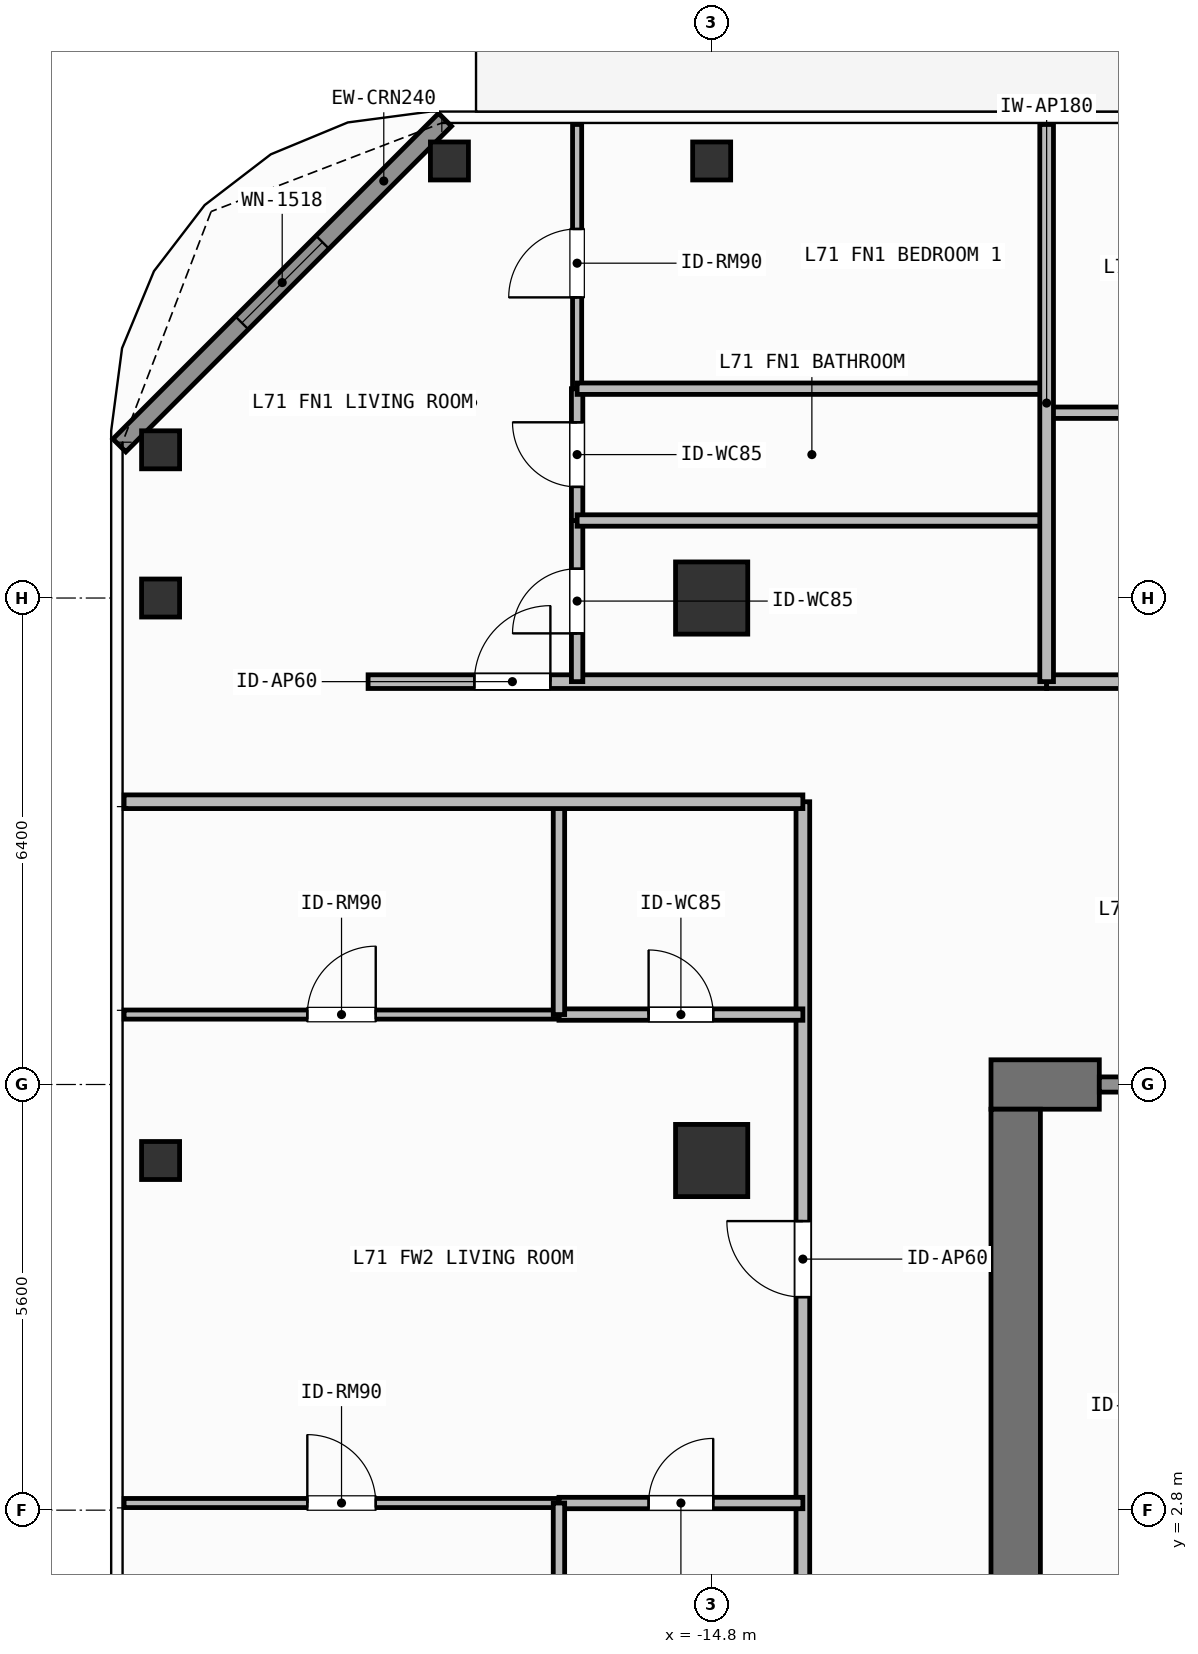
"""IFC4 building model, lengths in metres.
Left out: names, types, materials, properties, quantities, classifications, styles, units other than length and angle.
Written with IfcOpenShell. Run it as: python <this file> out.ifc"""

import sys

from ifc_helpers import new_model, si_unit, direction, frame, frame_2d, origin, origin_2d, place, context, subcontext, project, spatial, rectangle, hollow_rectangle, extrude, element, fill, save


model = new_model("IFC4")
c1 = context("Model", 3, precision=1e-05, world=origin(), true_north=direction((0.0, 1.0)))
c2 = subcontext(c1, "Body", "Model", "MODEL_VIEW")
j1 = project(units=[si_unit("LENGTHUNIT", "METRE"), si_unit("PLANEANGLEUNIT", "RADIAN")], contexts=[c1])
p1 = place(None, origin())
s1 = spatial("IfcSite", under=j1, at=p1, CompositionType="ELEMENT")
p2 = place(p1, origin())
s2 = spatial("IfcBuilding", under=s1, at=p2, CompositionType="ELEMENT")
p3 = place(p2, frame((0.0, 0.0, 289.8)))
s3 = spatial("IfcBuildingStorey", under=s2, at=p3, CompositionType="ELEMENT", Elevation=289.8)
p4 = place(p3, frame((-11.125, 8.4, 0.0), z_axis=(0.0, 0.0, 1.0), x_axis=(1.0, 0.0, 0.0)))
e1 = element("IfcWall", 1, at=p4, inside=s3, PredefinedType="SHEAR", context=c2, shape_type="SweptSolid", body=[
    extrude(rectangle(XDim=1.425, YDim=0.65, at=frame_2d((0.712, 0.0))), origin(), (0.0, 0.0, 1.0), 3.9),
])
p5 = place(p3, frame((-10.8, -8.075, 0.0), z_axis=(0.0, 0.0, 1.0), x_axis=(0.0, 1.0, 0.0)))
e2 = element("IfcWall", 2, at=p5, inside=s3, PredefinedType="SHEAR", context=c2, shape_type="SweptSolid", body=[
    extrude(rectangle(XDim=16.15, YDim=0.65, at=frame_2d((8.075, 0.0))), origin(), (0.0, 0.0, 1.0), 3.9),
])
for number, where, z_axis, x_axis in (
    (3, (-14.8, 14.8, 0.0), (0.0, 0.0, 1.0), (1.0, 0.0, 0.0)),
    (4, (-14.8, 7.4, 0.0), (0.0, 0.0, 1.0), (1.0, 0.0, 0.0)),
):
    element("IfcColumn", number, at=place(p3, frame(where, z_axis=z_axis, x_axis=x_axis)), inside=s3, PredefinedType="COLUMN", context=c2, shape_type="SweptSolid", body=[
        extrude(rectangle(XDim=0.95, YDim=0.95, at=origin_2d()), origin(), (0.0, 0.0, 1.0), 3.9),
    ])
for number, where, z_axis, x_axis in (
    (5, (-18.25, 20.55, 0.0), (0.0, 0.0, 1.0), (1.0, 0.0, 0.0)),
    (6, (-22.05, 16.75, 0.0), (0.0, 0.0, 1.0), (1.0, 0.0, 0.0)),
    (7, (-14.8, 20.55, 0.0), (0.0, 0.0, 1.0), (1.0, 0.0, 0.0)),
    (8, (-22.05, 7.4, 0.0), (0.0, 0.0, 1.0), (1.0, 0.0, 0.0)),
    (9, (-22.05, 14.8, 0.0), (0.0, 0.0, 1.0), (1.0, 0.0, 0.0)),
):
    element("IfcColumn", number, at=place(p3, frame(where, z_axis=z_axis, x_axis=x_axis)), inside=s3, PredefinedType="COLUMN", context=c2, shape_type="SweptSolid", body=[
        extrude(hollow_rectangle(XDim=0.5, YDim=0.5, WallThickness=0.025, at=origin_2d()), origin(), (0.0, 0.0, 1.0), 3.9),
    ])
p6 = place(p3, frame((-22.592, 16.808, 0.0), z_axis=(0.0, 0.0, 1.0), x_axis=(0.707106781187, 0.707106781187, 0.0)))
e10 = element("IfcWall", 10, at=p6, inside=s3, PredefinedType="SOLIDWALL", context=c2, shape_type="SweptSolid", body=[
    extrude(rectangle(XDim=6.059, YDim=0.24, at=frame_2d((3.03, 0.0))), origin(), (0.0, 0.0, 1.0), 3.68),
])
p7 = place(p6, frame((2.28, 0.0, 0.8)))
e11 = element("IfcOpeningElement", 11, at=p7, cuts=e10, PredefinedType="OPENING", context=c2, shape_type="SweptSolid", body=[
    extrude(rectangle(XDim=1.5, YDim=1.85, at=frame_2d((0.75, 0.925))), frame((0.0, 0.13, 0.0), z_axis=(0.0, -1.0, 0.0), x_axis=(1.0, 0.0, 0.0)), (0.0, 0.0, 1.0), 0.26),
])
p8 = place(p3, frame((-9.7, 8.4, 0.0), z_axis=(0.0, 0.0, 1.0), x_axis=(1.0, 0.0, 0.0)))
e12 = element("IfcWall", 12, at=p8, inside=s3, PredefinedType="SOLIDWALL", context=c2, shape_type="SweptSolid", body=[
    extrude(rectangle(XDim=2.15, YDim=0.2, at=frame_2d((1.075, 0.0))), origin(), (0.0, 0.0, 1.0), 2.92),
])
p9 = place(p8, frame((0.598, 0.0, 0.0)))
e13 = element("IfcOpeningElement", 13, at=p9, cuts=e12, PredefinedType="OPENING", context=c2, shape_type="SweptSolid", body=[
    extrude(rectangle(XDim=1.1, YDim=2.15, at=frame_2d((0.55, 1.075))), frame((0.0, 0.11, 0.0), z_axis=(0.0, -1.0, 0.0), x_axis=(1.0, 0.0, 0.0)), (0.0, 0.0, 1.0), 0.22),
])
p10 = place(p3, frame((-19.32, 13.7, 0.0), z_axis=(0.0, 0.0, 1.0), x_axis=(1.0, 0.0, 0.0)))
e14 = element("IfcWall", 14, at=p10, inside=s3, PredefinedType="PARTITIONING", context=c2, shape_type="SweptSolid", body=[
    extrude(rectangle(XDim=8.927, YDim=0.18, at=frame_2d((4.463, 0.0))), origin(), (0.0, 0.0, 1.0), 3.68),
])
p11 = place(p10, frame((1.398, 0.0, 0.0)))
e15 = element("IfcOpeningElement", 15, at=p11, cuts=e14, PredefinedType="OPENING", context=c2, shape_type="SweptSolid", body=[
    extrude(rectangle(XDim=1.0, YDim=2.2, at=frame_2d((0.5, 1.1))), frame((0.0, 0.1, 0.0), z_axis=(0.0, -1.0, 0.0), x_axis=(1.0, 0.0, 0.0)), (0.0, 0.0, 1.0), 0.2),
])
p12 = place(p3, frame((-16.57, 13.7, 0.0), z_axis=(0.0, 0.0, 1.0), x_axis=(0.0, 1.0, 0.0)))
e16 = element("IfcWall", 16, at=p12, inside=s3, PredefinedType="PARTITIONING", context=c2, shape_type="SweptSolid", body=[
    extrude(rectangle(XDim=2.12, YDim=0.15, at=frame_2d((1.06, 0.0))), origin(), (0.0, 0.0, 1.0), 3.68),
])
p13 = place(p12, frame((0.635, 0.0, 0.0)))
e17 = element("IfcOpeningElement", 17, at=p13, cuts=e16, PredefinedType="OPENING", context=c2, shape_type="SweptSolid", body=[
    extrude(rectangle(XDim=0.85, YDim=2.1, at=frame_2d((0.425, 1.05))), frame((0.0, 0.085, 0.0), z_axis=(0.0, -1.0, 0.0), x_axis=(1.0, 0.0, 0.0)), (0.0, 0.0, 1.0), 0.17),
])
p14 = place(p3, frame((-16.57, 15.82, 0.0), z_axis=(0.0, 0.0, 1.0), x_axis=(0.0, 1.0, 0.0)))
e18 = element("IfcWall", 18, at=p14, inside=s3, PredefinedType="PARTITIONING", context=c2, shape_type="SweptSolid", body=[
    extrude(rectangle(XDim=1.734, YDim=0.15, at=frame_2d((0.867, 0.0))), origin(), (0.0, 0.0, 1.0), 3.68),
])
p15 = place(p14, frame((0.442, 0.0, 0.0)))
e19 = element("IfcOpeningElement", 19, at=p15, cuts=e18, PredefinedType="OPENING", context=c2, shape_type="SweptSolid", body=[
    extrude(rectangle(XDim=0.85, YDim=2.1, at=frame_2d((0.425, 1.05))), frame((0.0, 0.085, 0.0), z_axis=(0.0, -1.0, 0.0), x_axis=(1.0, 0.0, 0.0)), (0.0, 0.0, 1.0), 0.17),
])
p16 = place(p3, frame((-16.57, 17.554, 0.0), z_axis=(0.0, 0.0, 1.0), x_axis=(0.0, 1.0, 0.0)))
e20 = element("IfcWall", 20, at=p16, inside=s3, PredefinedType="PARTITIONING", context=c2, shape_type="SweptSolid", body=[
    extrude(rectangle(XDim=3.476, YDim=0.12, at=frame_2d((1.738, 0.0))), origin(), (0.0, 0.0, 1.0), 3.68),
])
p17 = place(p16, frame((1.201, 0.0, 0.0)))
e21 = element("IfcOpeningElement", 21, at=p17, cuts=e20, PredefinedType="OPENING", context=c2, shape_type="SweptSolid", body=[
    extrude(rectangle(XDim=0.9, YDim=2.1, at=frame_2d((0.45, 1.05))), frame((0.0, 0.07, 0.0), z_axis=(0.0, -1.0, 0.0), x_axis=(1.0, 0.0, 0.0)), (0.0, 0.0, 1.0), 0.14),
])
p18 = place(p3, frame((-10.393, 13.7, 0.0), z_axis=(0.0, 0.0, 1.0), x_axis=(1.0, 0.0, 0.0)))
e22 = element("IfcWall", 22, at=p18, inside=s3, PredefinedType="PARTITIONING", context=c2, shape_type="SweptSolid", body=[
    extrude(rectangle(XDim=15.835, YDim=0.18, at=frame_2d((7.917, 0.0))), origin(), (0.0, 0.0, 1.0), 3.68),
])
p19 = place(p18, frame((8.224, 0.0, 0.0)))
e23 = element("IfcOpeningElement", 23, at=p19, cuts=e22, PredefinedType="OPENING", context=c2, shape_type="SweptSolid", body=[
    extrude(rectangle(XDim=1.0, YDim=2.2, at=frame_2d((0.5, 1.1))), frame((0.0, 0.1, 0.0), z_axis=(0.0, -1.0, 0.0), x_axis=(1.0, 0.0, 0.0)), (0.0, 0.0, 1.0), 0.2),
])
p20 = place(p3, frame((-13.6, -1.164, 0.0), z_axis=(0.0, 0.0, 1.0), x_axis=(0.0, 1.0, 0.0)))
e24 = element("IfcWall", 24, at=p20, inside=s3, PredefinedType="PARTITIONING", context=c2, shape_type="SweptSolid", body=[
    extrude(rectangle(XDim=13.284, YDim=0.18, at=frame_2d((6.642, 0.0))), origin(), (0.0, 0.0, 1.0), 3.68),
])
p21 = place(p20, frame((6.767, 0.0, 0.0)))
e25 = element("IfcOpeningElement", 25, at=p21, cuts=e24, PredefinedType="OPENING", context=c2, shape_type="SweptSolid", body=[
    extrude(rectangle(XDim=1.0, YDim=2.2, at=frame_2d((0.5, 1.1))), frame((0.0, 0.1, 0.0), z_axis=(0.0, -1.0, 0.0), x_axis=(1.0, 0.0, 0.0)), (0.0, 0.0, 1.0), 0.2),
])
p22 = place(p3, frame((-16.809, 9.32, 0.0), z_axis=(0.0, 0.0, 1.0), x_axis=(1.0, 0.0, 0.0)))
e26 = element("IfcWall", 26, at=p22, inside=s3, PredefinedType="PARTITIONING", context=c2, shape_type="SweptSolid", body=[
    extrude(rectangle(XDim=3.209, YDim=0.15, at=frame_2d((1.604, 0.0))), origin(), (0.0, 0.0, 1.0), 3.68),
])
p23 = place(p22, frame((1.179, 0.0, 0.0)))
e27 = element("IfcOpeningElement", 27, at=p23, cuts=e26, PredefinedType="OPENING", context=c2, shape_type="SweptSolid", body=[
    extrude(rectangle(XDim=0.85, YDim=2.1, at=frame_2d((0.425, 1.05))), frame((0.0, 0.085, 0.0), z_axis=(0.0, -1.0, 0.0), x_axis=(1.0, 0.0, 0.0)), (0.0, 0.0, 1.0), 0.17),
])
p24 = place(p3, frame((-16.809, 2.894, 0.0), z_axis=(0.0, 0.0, 1.0), x_axis=(1.0, 0.0, 0.0)))
e28 = element("IfcWall", 28, at=p24, inside=s3, PredefinedType="PARTITIONING", context=c2, shape_type="SweptSolid", body=[
    extrude(rectangle(XDim=3.209, YDim=0.15, at=frame_2d((1.604, 0.0))), origin(), (0.0, 0.0, 1.0), 3.68),
])
p25 = place(p24, frame((1.179, 0.0, 0.0)))
e29 = element("IfcOpeningElement", 29, at=p25, cuts=e28, PredefinedType="OPENING", context=c2, shape_type="SweptSolid", body=[
    extrude(rectangle(XDim=0.85, YDim=2.1, at=frame_2d((0.425, 1.05))), frame((0.0, 0.085, 0.0), z_axis=(0.0, -1.0, 0.0), x_axis=(1.0, 0.0, 0.0)), (0.0, 0.0, 1.0), 0.17),
])
p26 = place(p3, frame((-22.53, 2.894, 0.0), z_axis=(0.0, 0.0, 1.0), x_axis=(1.0, 0.0, 0.0)))
e30 = element("IfcWall", 30, at=p26, inside=s3, PredefinedType="PARTITIONING", context=c2, shape_type="SweptSolid", body=[
    extrude(rectangle(XDim=5.721, YDim=0.12, at=frame_2d((2.86, 0.0))), origin(), (0.0, 0.0, 1.0), 3.68),
])
p27 = place(p26, frame((2.41, 0.0, 0.0)))
e31 = element("IfcOpeningElement", 31, at=p27, cuts=e30, PredefinedType="OPENING", context=c2, shape_type="SweptSolid", body=[
    extrude(rectangle(XDim=0.9, YDim=2.1, at=frame_2d((0.45, 1.05))), frame((0.0, 0.07, 0.0), z_axis=(0.0, -1.0, 0.0), x_axis=(1.0, 0.0, 0.0)), (0.0, 0.0, 1.0), 0.14),
])
p28 = place(p3, frame((-22.53, 9.32, 0.0), z_axis=(0.0, 0.0, 1.0), x_axis=(1.0, 0.0, 0.0)))
e32 = element("IfcWall", 32, at=p28, inside=s3, PredefinedType="PARTITIONING", context=c2, shape_type="SweptSolid", body=[
    extrude(rectangle(XDim=5.721, YDim=0.12, at=frame_2d((2.86, 0.0))), origin(), (0.0, 0.0, 1.0), 3.68),
])
p29 = place(p28, frame((2.41, 0.0, 0.0)))
e33 = element("IfcOpeningElement", 33, at=p29, cuts=e32, PredefinedType="OPENING", context=c2, shape_type="SweptSolid", body=[
    extrude(rectangle(XDim=0.9, YDim=2.1, at=frame_2d((0.45, 1.05))), frame((0.0, 0.07, 0.0), z_axis=(0.0, -1.0, 0.0), x_axis=(1.0, 0.0, 0.0)), (0.0, 0.0, 1.0), 0.14),
])
for number, where, z_axis, x_axis in (
    (34, (-16.57, 15.82, 0.0), (0.0, 0.0, 1.0), (1.0, 0.0, 0.0)),
    (35, (-16.57, 17.554, 0.0), (0.0, 0.0, 1.0), (1.0, 0.0, 0.0)),
):
    element("IfcWall", number, at=place(p3, frame(where, z_axis=z_axis, x_axis=x_axis)), inside=s3, PredefinedType="PARTITIONING", context=c2, shape_type="SweptSolid", body=[
        extrude(rectangle(XDim=6.177, YDim=0.15, at=frame_2d((3.088, 0.0))), origin(), (0.0, 0.0, 1.0), 3.68),
    ])
p30 = place(p3, frame((-10.393, 17.238, 0.0), z_axis=(0.0, 0.0, 1.0), x_axis=(1.0, 0.0, 0.0)))
e36 = element("IfcWall", 36, at=p30, inside=s3, PredefinedType="PARTITIONING", context=c2, shape_type="SweptSolid", body=[
    extrude(rectangle(XDim=5.352, YDim=0.15, at=frame_2d((2.676, 0.0))), origin(), (0.0, 0.0, 1.0), 3.68),
])
p31 = place(p3, frame((-10.393, 13.7, 0.0), z_axis=(0.0, 0.0, 1.0), x_axis=(0.0, 1.0, 0.0)))
e37 = element("IfcWall", 37, at=p31, inside=s3, PredefinedType="PARTITIONING", context=c2, shape_type="SweptSolid", body=[
    extrude(rectangle(XDim=7.33, YDim=0.18, at=frame_2d((3.665, 0.0))), origin(), (0.0, 0.0, 1.0), 3.68),
])
p32 = place(p3, frame((-16.809, -1.164, 0.0), z_axis=(0.0, 0.0, 1.0), x_axis=(0.0, 1.0, 0.0)))
e38 = element("IfcWall", 38, at=p32, inside=s3, PredefinedType="PARTITIONING", context=c2, shape_type="SweptSolid", body=[
    extrude(rectangle(XDim=4.058, YDim=0.15, at=frame_2d((2.029, 0.0))), origin(), (0.0, 0.0, 1.0), 3.68),
])
p33 = place(p3, frame((-16.809, 9.32, 0.0), z_axis=(0.0, 0.0, 1.0), x_axis=(0.0, 1.0, 0.0)))
e39 = element("IfcWall", 39, at=p33, inside=s3, PredefinedType="PARTITIONING", context=c2, shape_type="SweptSolid", body=[
    extrude(rectangle(XDim=2.8, YDim=0.15, at=frame_2d((1.4, 0.0))), origin(), (0.0, 0.0, 1.0), 3.68),
])
p34 = place(p3, frame((-22.53, 12.12, 0.0), z_axis=(0.0, 0.0, 1.0), x_axis=(1.0, 0.0, 0.0)))
e40 = element("IfcWall", 40, at=p34, inside=s3, PredefinedType="PARTITIONING", context=c2, shape_type="SweptSolid", body=[
    extrude(rectangle(XDim=8.93, YDim=0.18, at=frame_2d((4.465, 0.0))), origin(), (0.0, 0.0, 1.0), 3.68),
])
p35 = place(p7, origin())
e41 = element("IfcWindow", 41, at=p35, inside=s3, PartitioningType="SINGLE_PANEL", PredefinedType="WINDOW", context=c2, shape_type="SweptSolid", body=[
    extrude(rectangle(XDim=1.5, YDim=1.85, at=frame_2d((0.75, 0.925))), frame((0.0, 0.03, 0.0), z_axis=(0.0, -1.0, 0.0), x_axis=(1.0, 0.0, 0.0)), (0.0, 0.0, 1.0), 0.06),
])
fill(e11, e41)
p36 = place(p11, origin())
e42 = element("IfcDoor", 42, at=p36, inside=s3, OperationType="SINGLE_SWING_RIGHT", PredefinedType="DOOR", context=c2, shape_type="SweptSolid", body=[
    extrude(rectangle(XDim=1.0, YDim=2.2, at=frame_2d((0.5, 1.1))), frame((0.0, 0.025, 0.0), z_axis=(0.0, -1.0, 0.0), x_axis=(1.0, 0.0, 0.0)), (0.0, 0.0, 1.0), 0.05),
])
fill(e15, e42)
p37 = place(p13, origin())
e43 = element("IfcDoor", 43, at=p37, inside=s3, OperationType="SINGLE_SWING_LEFT", PredefinedType="DOOR", context=c2, shape_type="SweptSolid", body=[
    extrude(rectangle(XDim=0.85, YDim=2.1, at=frame_2d((0.425, 1.05))), frame((0.0, 0.025, 0.0), z_axis=(0.0, -1.0, 0.0), x_axis=(1.0, 0.0, 0.0)), (0.0, 0.0, 1.0), 0.05),
])
fill(e17, e43)
p38 = place(p15, origin())
e44 = element("IfcDoor", 44, at=p38, inside=s3, OperationType="SINGLE_SWING_RIGHT", PredefinedType="DOOR", context=c2, shape_type="SweptSolid", body=[
    extrude(rectangle(XDim=0.85, YDim=2.1, at=frame_2d((0.425, 1.05))), frame((0.0, 0.025, 0.0), z_axis=(0.0, -1.0, 0.0), x_axis=(1.0, 0.0, 0.0)), (0.0, 0.0, 1.0), 0.05),
])
fill(e19, e44)
p39 = place(p17, origin())
e45 = element("IfcDoor", 45, at=p39, inside=s3, OperationType="SINGLE_SWING_LEFT", PredefinedType="DOOR", context=c2, shape_type="SweptSolid", body=[
    extrude(rectangle(XDim=0.9, YDim=2.1, at=frame_2d((0.45, 1.05))), frame((0.0, 0.025, 0.0), z_axis=(0.0, -1.0, 0.0), x_axis=(1.0, 0.0, 0.0)), (0.0, 0.0, 1.0), 0.05),
])
fill(e21, e45)
p40 = place(p21, origin())
e46 = element("IfcDoor", 46, at=p40, inside=s3, OperationType="SINGLE_SWING_RIGHT", PredefinedType="DOOR", context=c2, shape_type="SweptSolid", body=[
    extrude(rectangle(XDim=1.0, YDim=2.2, at=frame_2d((0.5, 1.1))), frame((0.0, 0.025, 0.0), z_axis=(0.0, -1.0, 0.0), x_axis=(1.0, 0.0, 0.0)), (0.0, 0.0, 1.0), 0.05),
])
fill(e25, e46)
p41 = place(p23, origin())
e47 = element("IfcDoor", 47, at=p41, inside=s3, OperationType="SINGLE_SWING_LEFT", PredefinedType="DOOR", context=c2, shape_type="SweptSolid", body=[
    extrude(rectangle(XDim=0.85, YDim=2.1, at=frame_2d((0.425, 1.05))), frame((0.0, 0.025, 0.0), z_axis=(0.0, -1.0, 0.0), x_axis=(1.0, 0.0, 0.0)), (0.0, 0.0, 1.0), 0.05),
])
fill(e27, e47)
p42 = place(p25, origin())
e48 = element("IfcDoor", 48, at=p42, inside=s3, OperationType="SINGLE_SWING_RIGHT", PredefinedType="DOOR", context=c2, shape_type="SweptSolid", body=[
    extrude(rectangle(XDim=0.85, YDim=2.1, at=frame_2d((0.425, 1.05))), frame((0.0, 0.025, 0.0), z_axis=(0.0, -1.0, 0.0), x_axis=(1.0, 0.0, 0.0)), (0.0, 0.0, 1.0), 0.05),
])
fill(e29, e48)
p43 = place(p27, origin())
e49 = element("IfcDoor", 49, at=p43, inside=s3, OperationType="SINGLE_SWING_LEFT", PredefinedType="DOOR", context=c2, shape_type="SweptSolid", body=[
    extrude(rectangle(XDim=0.9, YDim=2.1, at=frame_2d((0.45, 1.05))), frame((0.0, 0.025, 0.0), z_axis=(0.0, -1.0, 0.0), x_axis=(1.0, 0.0, 0.0)), (0.0, 0.0, 1.0), 0.05),
])
fill(e31, e49)
p44 = place(p29, origin())
e50 = element("IfcDoor", 50, at=p44, inside=s3, OperationType="SINGLE_SWING_RIGHT", PredefinedType="DOOR", context=c2, shape_type="SweptSolid", body=[
    extrude(rectangle(XDim=0.9, YDim=2.1, at=frame_2d((0.45, 1.05))), frame((0.0, 0.025, 0.0), z_axis=(0.0, -1.0, 0.0), x_axis=(1.0, 0.0, 0.0)), (0.0, 0.0, 1.0), 0.05),
])
fill(e33, e50)
save(model, sys.argv[1])
